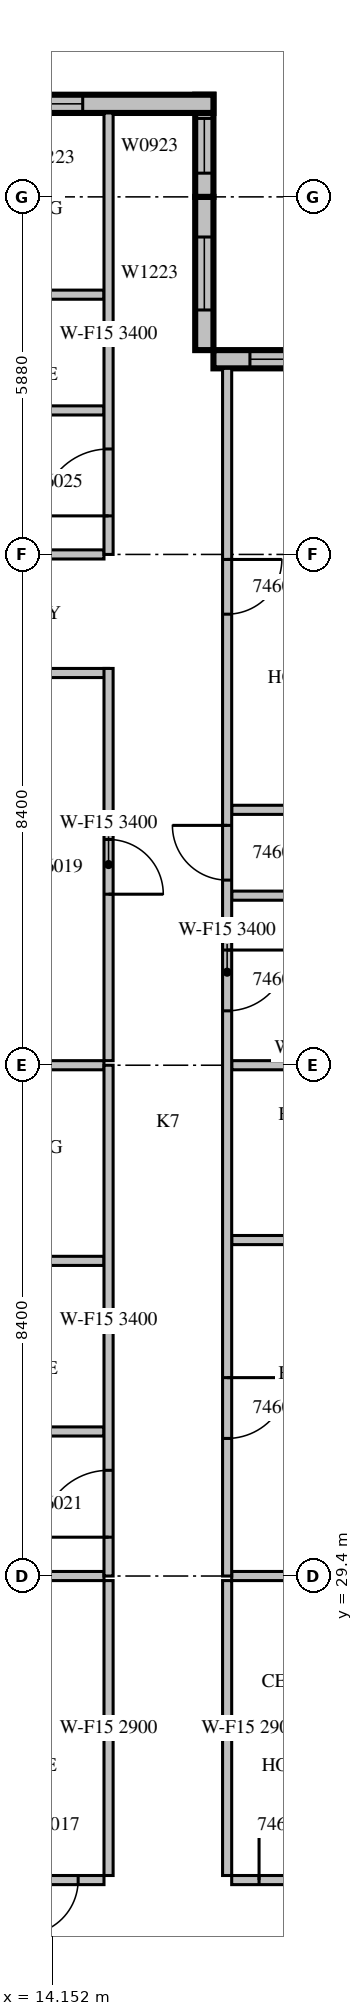
"""IFC4 building model, lengths in metres.
Left out: names, types, materials, properties, quantities, classifications, styles, units other than length and angle.
Written with IfcOpenShell. Run it as: python <this file> out.ifc"""

import sys

from ifc_helpers import new_model, si_unit, direction, frame, frame_2d, origin, place, context, subcontext, project, spatial, rectangle, extrude, source, transform, mapped, element, fill, save


model = new_model("IFC4")
c1 = context("Model", 3, precision=1e-05, world=origin(), true_north=direction((0.0, 1.0)))
c2 = subcontext(c1, "Body", "Model", "MODEL_VIEW")
j1 = project(units=[si_unit("LENGTHUNIT", "METRE"), si_unit("PLANEANGLEUNIT", "RADIAN")], contexts=[c1])
p1 = place(None, origin())
s1 = spatial("IfcSite", under=j1, at=p1, CompositionType="ELEMENT")
p2 = place(p1, origin())
s2 = spatial("IfcBuilding", under=s1, at=p2, CompositionType="ELEMENT")
p3 = place(p2, frame((0.0, 0.0, 208.2)))
s3 = spatial("IfcBuildingStorey", under=s2, at=p3, CompositionType="ELEMENT", Elevation=208.2)
m1 = source(origin(), c2, "Body", "SweptSolid", [
    extrude(rectangle(XDim=4.2, YDim=0.3, at=frame_2d((2.1, 0.0))), origin(), (0.0, 0.0, 1.0), 3.4),
])
p4 = place(p3, frame((21.0, 49.41, 0.0), z_axis=(0.0, 0.0, 1.0), x_axis=(-1.0, 0.0, 0.0)))
e1 = element("IfcWall", 1, at=p4, inside=s3, PredefinedType="STANDARD", context=c2, shape_type="MappedRepresentation", body=[
    mapped(m1, transform((0.0, 0.0, 0.0), scale=1.0)),
])
m2 = source(origin(), c2, "Body", "SweptSolid", [
    extrude(rectangle(XDim=3.0, YDim=2.3, at=frame_2d((1.5, 1.15))), frame((0.0, 0.16, 0.0), z_axis=(0.0, -1.0, 0.0), x_axis=(1.0, 0.0, 0.0)), (0.0, 0.0, 1.0), 0.32),
])
p5 = place(p4, frame((0.6, 0.0, 0.6)))
e2 = element("IfcOpeningElement", 2, at=p5, cuts=e1, PredefinedType="OPENING", context=c2, shape_type="MappedRepresentation", body=[
    mapped(m2, transform((0.0, 0.0, 0.0), scale=1.0)),
])
m3 = source(origin(), c2, "Body", "SweptSolid", [
    extrude(rectangle(XDim=2.52, YDim=0.3, at=frame_2d((1.26, 0.0))), origin(), (0.0, 0.0, 1.0), 3.4),
])
p6 = place(p3, frame((16.65, 49.56, 0.0), z_axis=(0.0, 0.0, 1.0), x_axis=(0.0, 1.0, 0.0)))
e3 = element("IfcWall", 3, at=p6, inside=s3, PredefinedType="STANDARD", context=c2, shape_type="MappedRepresentation", body=[
    mapped(m3, transform((0.0, 0.0, 0.0), scale=1.0)),
])
m4 = source(origin(), c2, "Body", "SweptSolid", [
    extrude(rectangle(XDim=1.2, YDim=2.3, at=frame_2d((0.6, 1.15))), frame((0.0, 0.16, 0.0), z_axis=(0.0, -1.0, 0.0), x_axis=(1.0, 0.0, 0.0)), (0.0, 0.0, 1.0), 0.32),
])
p7 = place(p6, frame((0.66, 0.0, 0.6)))
e4 = element("IfcOpeningElement", 4, at=p7, cuts=e3, PredefinedType="OPENING", context=c2, shape_type="MappedRepresentation", body=[
    mapped(m4, transform((0.0, 0.0, 0.0), scale=1.0)),
])
m5 = source(origin(), c2, "Body", "SweptSolid", [
    extrude(rectangle(XDim=1.68, YDim=0.3, at=frame_2d((0.84, 0.0))), origin(), (0.0, 0.0, 1.0), 3.4),
])
p8 = place(p3, frame((16.65, 52.08, 0.0), z_axis=(0.0, 0.0, 1.0), x_axis=(0.0, 1.0, 0.0)))
e5 = element("IfcWall", 5, at=p8, inside=s3, PredefinedType="STANDARD", context=c2, shape_type="MappedRepresentation", body=[
    mapped(m5, transform((0.0, 0.0, 0.0), scale=1.0)),
])
m6 = source(origin(), c2, "Body", "SweptSolid", [
    extrude(rectangle(XDim=0.9, YDim=2.3, at=frame_2d((0.45, 1.15))), frame((0.0, 0.16, 0.0), z_axis=(0.0, -1.0, 0.0), x_axis=(1.0, 0.0, 0.0)), (0.0, 0.0, 1.0), 0.32),
])
p9 = place(p8, frame((0.39, 0.0, 0.6)))
e6 = element("IfcOpeningElement", 6, at=p9, cuts=e5, PredefinedType="OPENING", context=c2, shape_type="MappedRepresentation", body=[
    mapped(m6, transform((0.0, 0.0, 0.0), scale=1.0)),
])
m7 = source(origin(), c2, "Body", "SweptSolid", [
    extrude(rectangle(XDim=10.5, YDim=0.3, at=frame_2d((5.25, 0.0))), origin(), (0.0, 0.0, 1.0), 3.4),
])
p10 = place(p3, frame((16.8, 53.61, 0.0), z_axis=(0.0, 0.0, 1.0), x_axis=(-1.0, 0.0, 0.0)))
e7 = element("IfcWall", 7, at=p10, inside=s3, PredefinedType="STANDARD", context=c2, shape_type="MappedRepresentation", body=[
    mapped(m7, transform((0.0, 0.0, 0.0), scale=1.0)),
])
p11 = place(p10, frame((2.15, 0.0, 0.6)))
e8 = element("IfcOpeningElement", 8, at=p11, cuts=e7, PredefinedType="OPENING", context=c2, shape_type="MappedRepresentation", body=[
    mapped(m4, transform((0.0, 0.0, 0.0), scale=1.0)),
])
m8 = source(origin(), c2, "Body", "SweptSolid", [
    extrude(rectangle(XDim=1.8, YDim=2.3, at=frame_2d((0.9, 1.15))), frame((0.0, 0.16, 0.0), z_axis=(0.0, -1.0, 0.0), x_axis=(1.0, 0.0, 0.0)), (0.0, 0.0, 1.0), 0.32),
])
p12 = place(p10, frame((8.025, 0.0, 0.6)))
e9 = element("IfcOpeningElement", 9, at=p12, cuts=e7, PredefinedType="OPENING", context=c2, shape_type="MappedRepresentation", body=[
    mapped(m8, transform((0.0, 0.0, 0.0), scale=1.0)),
])
p13 = place(p3, frame((6.505, 24.4, 0.0), z_axis=(0.0, 0.0, 1.0), x_axis=(1.0, 0.0, 0.0)))
e10 = element("IfcWall", 10, at=p13, inside=s3, PredefinedType="PARTITIONING", context=c2, shape_type="SweptSolid", body=[
    extrude(rectangle(XDim=8.495, YDim=0.15, at=frame_2d((4.247, 0.0))), origin(), (0.0, 0.0, 1.0), 2.4),
])
m9 = source(origin(), c2, "Body", "SweptSolid", [
    extrude(rectangle(XDim=0.9, YDim=2.1, at=frame_2d((0.45, 1.05))), frame((0.0, 0.085, 0.0), z_axis=(0.0, -1.0, 0.0), x_axis=(1.0, 0.0, 0.0)), (0.0, 0.0, 1.0), 0.17),
])
p14 = place(p13, frame((2.095, 0.0, 0.0)))
e11 = element("IfcOpeningElement", 11, at=p14, cuts=e10, PredefinedType="OPENING", context=c2, shape_type="MappedRepresentation", body=[
    mapped(m9, transform((0.0, 0.0, 0.0), scale=1.0)),
])
p15 = place(p13, frame((7.17, 0.0, 0.0)))
e12 = element("IfcOpeningElement", 12, at=p15, cuts=e10, PredefinedType="OPENING", context=c2, shape_type="MappedRepresentation", body=[
    mapped(m9, transform((0.0, 0.0, 0.0), scale=1.0)),
])
m10 = source(origin(), c2, "Body", "SweptSolid", [
    extrude(rectangle(XDim=3.6, YDim=0.15, at=frame_2d((1.8, 0.0))), origin(), (0.0, 0.0, 1.0), 2.4),
])
p16 = place(p3, frame((17.1, 24.4, 0.0), z_axis=(0.0, 0.0, 1.0), x_axis=(1.0, 0.0, 0.0)))
e13 = element("IfcWall", 13, at=p16, inside=s3, PredefinedType="PARTITIONING", context=c2, shape_type="MappedRepresentation", body=[
    mapped(m10, transform((0.0, 0.0, 0.0), scale=1.0)),
])
p17 = place(p16, frame((0.45, 0.0, 0.0)))
e14 = element("IfcOpeningElement", 14, at=p17, cuts=e13, PredefinedType="OPENING", context=c2, shape_type="MappedRepresentation", body=[
    mapped(m9, transform((0.0, 0.0, 0.0), scale=1.0)),
])
m11 = source(origin(), c2, "Body", "SweptSolid", [
    extrude(rectangle(XDim=4.85, YDim=0.15, at=frame_2d((2.425, 0.0))), origin(), (0.0, 0.0, 1.0), 2.9),
])
for number, where, z_axis, x_axis in (
    (15, (15.075, 24.475, 0.0), (0.0, 0.0, 1.0), (0.0, 1.0, 0.0)),
    (16, (17.025, 29.325, 0.0), (0.0, 0.0, 1.0), (0.0, -1.0, 0.0)),
):
    element("IfcWall", number, at=place(p3, frame(where, z_axis=z_axis, x_axis=x_axis)), inside=s3, PredefinedType="PARTITIONING", context=c2, shape_type="MappedRepresentation", body=[
        mapped(m11, transform((0.0, 0.0, 0.0), scale=1.0)),
    ])
m12 = source(origin(), c2, "Body", "SweptSolid", [
    extrude(rectangle(XDim=4.051, YDim=0.15, at=frame_2d((2.026, 0.0))), origin(), (0.0, 0.0, 1.0), 3.4),
])
p18 = place(p3, frame((15.0, 29.4, 0.0), z_axis=(0.0, 0.0, 1.0), x_axis=(-1.0, 0.0, 0.0)))
e17 = element("IfcWall", 17, at=p18, inside=s3, PredefinedType="PARTITIONING", context=c2, shape_type="MappedRepresentation", body=[
    mapped(m12, transform((0.0, 0.0, 0.0), scale=1.0)),
])
m13 = source(origin(), c2, "Body", "SweptSolid", [
    extrude(rectangle(XDim=3.001, YDim=0.15, at=frame_2d((1.5, 0.0))), origin(), (0.0, 0.0, 1.0), 3.4),
])
p19 = place(p3, frame((20.101, 29.4, 0.0), z_axis=(0.0, 0.0, 1.0), x_axis=(-1.0, 0.0, 0.0)))
e18 = element("IfcWall", 18, at=p19, inside=s3, PredefinedType="PARTITIONING", context=c2, shape_type="MappedRepresentation", body=[
    mapped(m13, transform((0.0, 0.0, 0.0), scale=1.0)),
])
m14 = source(origin(), c2, "Body", "SweptSolid", [
    extrude(rectangle(XDim=3.575, YDim=0.15, at=frame_2d((1.788, 0.0))), origin(), (0.0, 0.0, 1.0), 3.4),
])
p20 = place(p3, frame((15.075, 44.25, 0.0), z_axis=(0.0, 0.0, 1.0), x_axis=(-1.0, 0.0, 0.0)))
e19 = element("IfcWall", 19, at=p20, inside=s3, PredefinedType="PARTITIONING", context=c2, shape_type="MappedRepresentation", body=[
    mapped(m14, transform((0.0, 0.0, 0.0), scale=1.0)),
])
m15 = source(origin(), c2, "Body", "SweptSolid", [
    extrude(rectangle(XDim=6.45, YDim=0.15, at=frame_2d((3.225, 0.0))), origin(), (0.0, 0.0, 1.0), 3.4),
])
p21 = place(p3, frame((15.075, 37.875, 0.0), z_axis=(0.0, 0.0, 1.0), x_axis=(0.0, 1.0, 0.0)))
e20 = element("IfcWall", 20, at=p21, inside=s3, PredefinedType="PARTITIONING", context=c2, shape_type="MappedRepresentation", body=[
    mapped(m15, transform((0.0, 0.0, 0.0), scale=1.0)),
])
p22 = place(p21, frame((2.737, 0.0, 0.0)))
e21 = element("IfcOpeningElement", 21, at=p22, cuts=e20, PredefinedType="OPENING", context=c2, shape_type="MappedRepresentation", body=[
    mapped(m9, transform((0.0, 0.0, 0.0), scale=1.0)),
])
m16 = source(origin(), c2, "Body", "SweptSolid", [
    extrude(rectangle(XDim=3.9, YDim=0.15, at=frame_2d((1.95, 0.0))), origin(), (0.0, 0.0, 1.0), 3.4),
])
for number, where, z_axis, x_axis in (
    (22, (15.0, 31.777, 0.0), (0.0, 0.0, 1.0), (-1.0, 0.0, 0.0)),
    (23, (15.0, 34.583, 0.0), (0.0, 0.0, 1.0), (-1.0, 0.0, 0.0)),
    (24, (15.0, 37.8, 0.0), (0.0, 0.0, 1.0), (-1.0, 0.0, 0.0)),
    (25, (15.0, 48.568, 0.0), (0.0, 0.0, 1.0), (-1.0, 0.0, 0.0)),
    (26, (15.0, 50.472, 0.0), (0.0, 0.0, 1.0), (-1.0, 0.0, 0.0)),
    (27, (15.0, 46.2, 0.0), (0.0, 0.0, 1.0), (-1.0, 0.0, 0.0)),
):
    element("IfcWall", number, at=place(p3, frame(where, z_axis=z_axis, x_axis=x_axis)), inside=s3, PredefinedType="PARTITIONING", context=c2, shape_type="MappedRepresentation", body=[
        mapped(m16, transform((0.0, 0.0, 0.0), scale=1.0)),
    ])
m17 = source(origin(), c2, "Body", "SweptSolid", [
    extrude(rectangle(XDim=3.6, YDim=0.15, at=frame_2d((1.8, 0.0))), origin(), (0.0, 0.0, 1.0), 3.4),
])
p23 = place(p3, frame((17.1, 34.925, 0.0), z_axis=(0.0, 0.0, 1.0), x_axis=(1.0, 0.0, 0.0)))
e28 = element("IfcWall", 28, at=p23, inside=s3, PredefinedType="PARTITIONING", context=c2, shape_type="MappedRepresentation", body=[
    mapped(m17, transform((0.0, 0.0, 0.0), scale=1.0)),
])
p24 = place(p23, frame((1.35, 0.0, 0.0)))
e29 = element("IfcOpeningElement", 29, at=p24, cuts=e28, PredefinedType="OPENING", context=c2, shape_type="MappedRepresentation", body=[
    mapped(m9, transform((0.0, 0.0, 0.0), scale=1.0)),
])
p25 = place(p3, frame((17.1, 40.589, 0.0), z_axis=(0.0, 0.0, 1.0), x_axis=(1.0, 0.0, 0.0)))
e30 = element("IfcWall", 30, at=p25, inside=s3, PredefinedType="PARTITIONING", context=c2, shape_type="MappedRepresentation", body=[
    mapped(m17, transform((0.0, 0.0, 0.0), scale=1.0)),
])
p26 = place(p3, frame((20.101, 37.8, 0.0), z_axis=(0.0, 0.0, 1.0), x_axis=(-1.0, 0.0, 0.0)))
e31 = element("IfcWall", 31, at=p26, inside=s3, PredefinedType="PARTITIONING", context=c2, shape_type="MappedRepresentation", body=[
    mapped(m13, transform((0.0, 0.0, 0.0), scale=1.0)),
])
p27 = place(p3, frame((20.7, 42.0, 0.0), z_axis=(0.0, 0.0, 1.0), x_axis=(-1.0, 0.0, 0.0)))
e32 = element("IfcWall", 32, at=p27, inside=s3, PredefinedType="PARTITIONING", context=c2, shape_type="MappedRepresentation", body=[
    mapped(m17, transform((0.0, 0.0, 0.0), scale=1.0)),
])
m18 = source(origin(), c2, "Body", "SweptSolid", [
    extrude(rectangle(XDim=8.4, YDim=0.15, at=frame_2d((4.2, 0.0))), origin(), (0.0, 0.0, 1.0), 3.4),
])
p28 = place(p3, frame((15.075, 29.4, 0.0), z_axis=(0.0, 0.0, 1.0), x_axis=(0.0, 1.0, 0.0)))
e33 = element("IfcWall", 33, at=p28, inside=s3, PredefinedType="PARTITIONING", context=c2, shape_type="MappedRepresentation", body=[
    mapped(m18, transform((0.0, 0.0, 0.0), scale=1.0)),
])
m19 = source(origin(), c2, "Body", "SweptSolid", [
    extrude(rectangle(XDim=1.1, YDim=2.1, at=frame_2d((0.55, 1.05))), frame((0.0, 0.085, 0.0), z_axis=(0.0, -1.0, 0.0), x_axis=(1.0, 0.0, 0.0)), (0.0, 0.0, 1.0), 0.17),
])
p29 = place(p28, frame((0.638, 0.0, 0.0)))
e34 = element("IfcOpeningElement", 34, at=p29, cuts=e33, PredefinedType="OPENING", context=c2, shape_type="MappedRepresentation", body=[
    mapped(m19, transform((0.0, 0.0, 0.0), scale=1.0)),
])
m20 = source(origin(), c2, "Body", "SweptSolid", [
    extrude(rectangle(XDim=7.26, YDim=0.15, at=frame_2d((3.63, 0.0))), origin(), (0.0, 0.0, 1.0), 3.4),
])
p30 = place(p3, frame((15.075, 46.2, 0.0), z_axis=(0.0, 0.0, 1.0), x_axis=(0.0, 1.0, 0.0)))
e35 = element("IfcWall", 35, at=p30, inside=s3, PredefinedType="PARTITIONING", context=c2, shape_type="MappedRepresentation", body=[
    mapped(m20, transform((0.0, 0.0, 0.0), scale=1.0)),
])
p31 = place(p30, frame((0.634, 0.0, 0.0)))
e36 = element("IfcOpeningElement", 36, at=p31, cuts=e35, PredefinedType="OPENING", context=c2, shape_type="MappedRepresentation", body=[
    mapped(m19, transform((0.0, 0.0, 0.0), scale=1.0)),
])
m21 = source(origin(), c2, "Body", "SweptSolid", [
    extrude(rectangle(XDim=19.86, YDim=0.15, at=frame_2d((9.93, 0.0))), origin(), (0.0, 0.0, 1.0), 3.4),
])
p32 = place(p3, frame((17.025, 49.26, 0.0), z_axis=(0.0, 0.0, 1.0), x_axis=(0.0, -1.0, 0.0)))
e37 = element("IfcWall", 37, at=p32, inside=s3, PredefinedType="PARTITIONING", context=c2, shape_type="MappedRepresentation", body=[
    mapped(m21, transform((0.0, 0.0, 0.0), scale=1.0)),
])
m22 = source(origin(), c2, "Body", "SweptSolid", [
    extrude(rectangle(XDim=1.0, YDim=2.1, at=frame_2d((0.5, 1.05))), frame((0.0, 0.085, 0.0), z_axis=(0.0, -1.0, 0.0), x_axis=(1.0, 0.0, 0.0)), (0.0, 0.0, 1.0), 0.17),
])
p33 = place(p32, frame((16.598, 0.0, 0.0)))
e38 = element("IfcOpeningElement", 38, at=p33, cuts=e37, PredefinedType="OPENING", context=c2, shape_type="MappedRepresentation", body=[
    mapped(m22, transform((0.0, 0.0, 0.0), scale=1.0)),
])
p34 = place(p32, frame((9.566, 0.0, 0.0)))
e39 = element("IfcOpeningElement", 39, at=p34, cuts=e37, PredefinedType="OPENING", context=c2, shape_type="MappedRepresentation", body=[
    mapped(m22, transform((0.0, 0.0, 0.0), scale=1.0)),
])
p35 = place(p32, frame((7.516, 0.0, 0.0)))
e40 = element("IfcOpeningElement", 40, at=p35, cuts=e37, PredefinedType="OPENING", context=c2, shape_type="MappedRepresentation", body=[
    mapped(m9, transform((0.0, 0.0, 0.0), scale=1.0)),
])
p36 = place(p32, frame((3.143, 0.0, 0.0)))
e41 = element("IfcOpeningElement", 41, at=p36, cuts=e37, PredefinedType="OPENING", context=c2, shape_type="MappedRepresentation", body=[
    mapped(m9, transform((0.0, 0.0, 0.0), scale=1.0)),
])
m23 = source(origin(), c2, "Body", "SweptSolid", [
    extrude(rectangle(XDim=3.0, YDim=2.3, at=frame_2d((1.5, 1.15))), frame((0.0, 0.03, 0.0), z_axis=(0.0, -1.0, 0.0), x_axis=(1.0, 0.0, 0.0)), (0.0, 0.0, 1.0), 0.06),
])
p37 = place(p5, origin())
e42 = element("IfcWindow", 42, at=p37, inside=s3, PartitioningType="SINGLE_PANEL", PredefinedType="WINDOW", context=c2, shape_type="MappedRepresentation", body=[
    mapped(m23, transform((0.0, 0.0, 0.0), scale=1.0)),
])
fill(e2, e42)
m24 = source(origin(), c2, "Body", "SweptSolid", [
    extrude(rectangle(XDim=1.2, YDim=2.3, at=frame_2d((0.6, 1.15))), frame((0.0, 0.03, 0.0), z_axis=(0.0, -1.0, 0.0), x_axis=(1.0, 0.0, 0.0)), (0.0, 0.0, 1.0), 0.06),
])
p38 = place(p7, origin())
e43 = element("IfcWindow", 43, at=p38, inside=s3, PartitioningType="SINGLE_PANEL", PredefinedType="WINDOW", context=c2, shape_type="MappedRepresentation", body=[
    mapped(m24, transform((0.0, 0.0, 0.0), scale=1.0)),
])
fill(e4, e43)
m25 = source(origin(), c2, "Body", "SweptSolid", [
    extrude(rectangle(XDim=0.9, YDim=2.3, at=frame_2d((0.45, 1.15))), frame((0.0, 0.03, 0.0), z_axis=(0.0, -1.0, 0.0), x_axis=(1.0, 0.0, 0.0)), (0.0, 0.0, 1.0), 0.06),
])
p39 = place(p9, origin())
e44 = element("IfcWindow", 44, at=p39, inside=s3, PartitioningType="SINGLE_PANEL", PredefinedType="WINDOW", context=c2, shape_type="MappedRepresentation", body=[
    mapped(m25, transform((0.0, 0.0, 0.0), scale=1.0)),
])
fill(e6, e44)
p40 = place(p11, origin())
e45 = element("IfcWindow", 45, at=p40, inside=s3, PartitioningType="SINGLE_PANEL", PredefinedType="WINDOW", context=c2, shape_type="MappedRepresentation", body=[
    mapped(m24, transform((0.0, 0.0, 0.0), scale=1.0)),
])
fill(e8, e45)
m26 = source(origin(), c2, "Body", "SweptSolid", [
    extrude(rectangle(XDim=0.9, YDim=2.1, at=frame_2d((0.45, 1.05))), frame((0.0, 0.025, 0.0), z_axis=(0.0, -1.0, 0.0), x_axis=(1.0, 0.0, 0.0)), (0.0, 0.0, 1.0), 0.05),
])
p41 = place(p15, origin())
e46 = element("IfcDoor", 46, at=p41, inside=s3, OperationType="SINGLE_SWING_RIGHT", PredefinedType="DOOR", context=c2, shape_type="MappedRepresentation", body=[
    mapped(m26, transform((0.0, 0.0, 0.0), scale=1.0)),
])
fill(e12, e46)
p42 = place(p17, origin())
e47 = element("IfcDoor", 47, at=p42, inside=s3, OperationType="SINGLE_SWING_LEFT", PredefinedType="DOOR", context=c2, shape_type="MappedRepresentation", body=[
    mapped(m26, transform((0.0, 0.0, 0.0), scale=1.0)),
])
fill(e14, e47)
p43 = place(p22, origin())
e48 = element("IfcDoor", 48, at=p43, inside=s3, OperationType="SINGLE_SWING_RIGHT", PredefinedType="DOOR", context=c2, shape_type="MappedRepresentation", body=[
    mapped(m26, transform((0.0, 0.0, 0.0), scale=1.0)),
])
fill(e21, e48)
m27 = source(origin(), c2, "Body", "SweptSolid", [
    extrude(rectangle(XDim=1.1, YDim=2.1, at=frame_2d((0.55, 1.05))), frame((0.0, 0.025, 0.0), z_axis=(0.0, -1.0, 0.0), x_axis=(1.0, 0.0, 0.0)), (0.0, 0.0, 1.0), 0.05),
])
p44 = place(p29, origin())
e49 = element("IfcDoor", 49, at=p44, inside=s3, OperationType="SINGLE_SWING_LEFT", PredefinedType="DOOR", context=c2, shape_type="MappedRepresentation", body=[
    mapped(m27, transform((0.0, 0.0, 0.0), scale=1.0)),
])
fill(e34, e49)
p45 = place(p31, origin())
e50 = element("IfcDoor", 50, at=p45, inside=s3, OperationType="SINGLE_SWING_LEFT", PredefinedType="DOOR", context=c2, shape_type="MappedRepresentation", body=[
    mapped(m27, transform((0.0, 0.0, 0.0), scale=1.0)),
])
fill(e36, e50)
m28 = source(origin(), c2, "Body", "SweptSolid", [
    extrude(rectangle(XDim=1.0, YDim=2.1, at=frame_2d((0.5, 1.05))), frame((0.0, 0.025, 0.0), z_axis=(0.0, -1.0, 0.0), x_axis=(1.0, 0.0, 0.0)), (0.0, 0.0, 1.0), 0.05),
])
p46 = place(p33, origin())
e51 = element("IfcDoor", 51, at=p46, inside=s3, OperationType="SINGLE_SWING_LEFT", PredefinedType="DOOR", context=c2, shape_type="MappedRepresentation", body=[
    mapped(m28, transform((0.0, 0.0, 0.0), scale=1.0)),
])
fill(e38, e51)
p47 = place(p34, origin())
e52 = element("IfcDoor", 52, at=p47, inside=s3, OperationType="SINGLE_SWING_LEFT", PredefinedType="DOOR", context=c2, shape_type="MappedRepresentation", body=[
    mapped(m28, transform((0.0, 0.0, 0.0), scale=1.0)),
])
fill(e39, e52)
p48 = place(p35, origin())
e53 = element("IfcDoor", 53, at=p48, inside=s3, OperationType="SINGLE_SWING_RIGHT", PredefinedType="DOOR", context=c2, shape_type="MappedRepresentation", body=[
    mapped(m26, transform((0.0, 0.0, 0.0), scale=1.0)),
])
fill(e40, e53)
p49 = place(p36, origin())
e54 = element("IfcDoor", 54, at=p49, inside=s3, OperationType="SINGLE_SWING_LEFT", PredefinedType="DOOR", context=c2, shape_type="MappedRepresentation", body=[
    mapped(m26, transform((0.0, 0.0, 0.0), scale=1.0)),
])
fill(e41, e54)
save(model, sys.argv[1])
